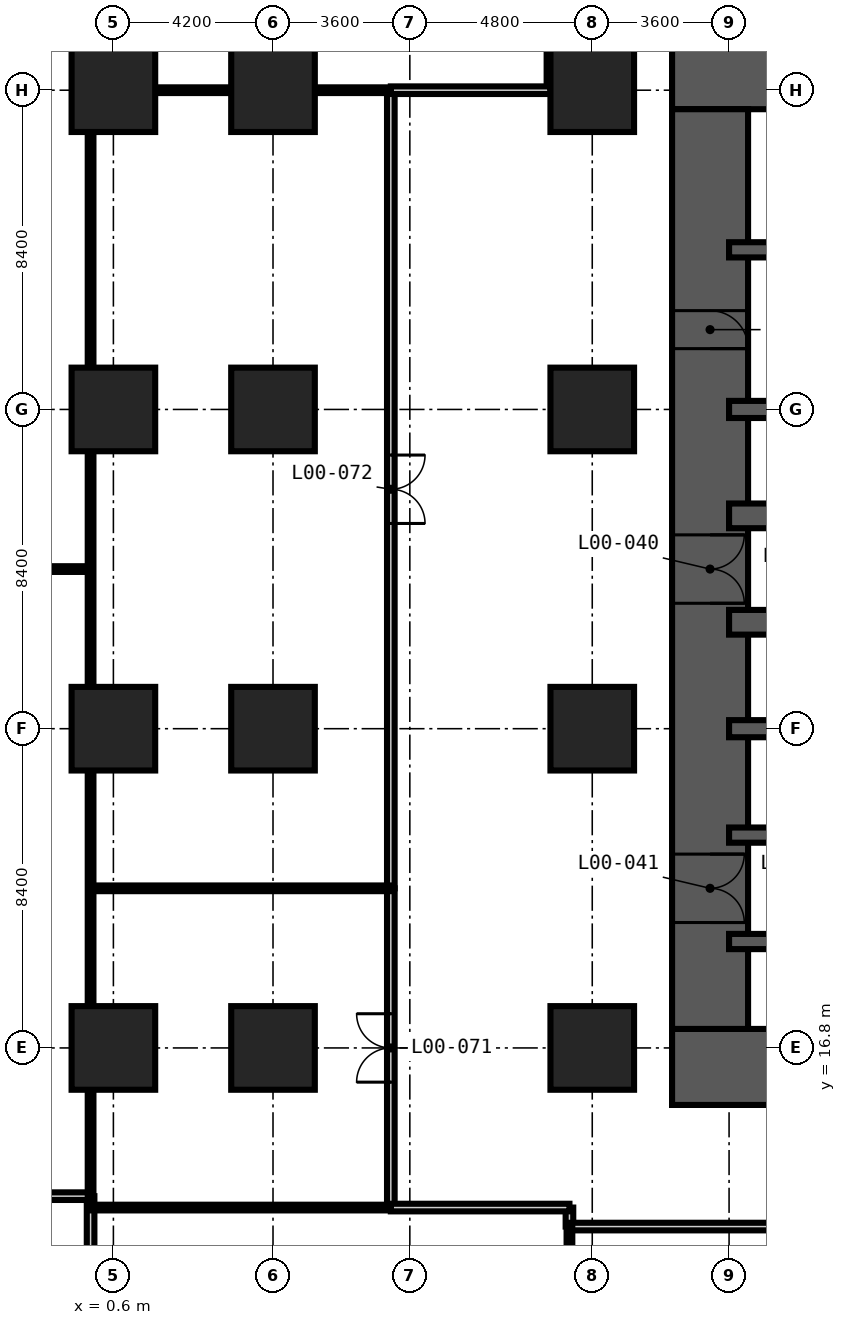
"""IFC4 building model, lengths in metres.
Left out: names, types, materials, properties, quantities, classifications, styles, units other than length and angle.
Written with IfcOpenShell. Run it as: python <this file> out.ifc"""

import sys

from ifc_helpers import new_model, si_unit, direction, frame, frame_2d, origin, origin_2d, place, context, subcontext, project, spatial, rectangle, extrude, element, fill, save


model = new_model("IFC4")
c1 = context("Model", 3, precision=1e-05, world=origin(), true_north=direction((0.0, 1.0)))
c2 = subcontext(c1, "Body", "Model", "MODEL_VIEW")
j1 = project(units=[si_unit("LENGTHUNIT", "METRE"), si_unit("PLANEANGLEUNIT", "RADIAN")], contexts=[c1])
p1 = place(None, origin())
s1 = spatial("IfcSite", under=j1, at=p1, CompositionType="ELEMENT")
p2 = place(p1, origin())
s2 = spatial("IfcBuilding", under=s1, at=p2, CompositionType="ELEMENT")
p3 = place(p2, origin())
s3 = spatial("IfcBuildingStorey", under=s2, at=p3, CompositionType="ELEMENT", Elevation=0.0)
for number, where, z_axis, x_axis in (
    (1, (0.6, 16.8, -0.3), (0.0, 0.0, 1.0), (1.0, 0.0, 0.0)),
    (2, (0.6, 25.2, -0.3), (0.0, 0.0, 1.0), (1.0, 0.0, 0.0)),
    (3, (0.6, 33.6, -0.3), (0.0, 0.0, 1.0), (1.0, 0.0, 0.0)),
    (4, (0.6, 42.0, -0.3), (0.0, 0.0, 1.0), (1.0, 0.0, 0.0)),
    (5, (4.8, 16.8, -0.3), (0.0, 0.0, 1.0), (1.0, 0.0, 0.0)),
    (6, (4.8, 25.2, -0.3), (0.0, 0.0, 1.0), (1.0, 0.0, 0.0)),
    (7, (4.8, 33.6, -0.3), (0.0, 0.0, 1.0), (1.0, 0.0, 0.0)),
    (8, (4.8, 42.0, -0.3), (0.0, 0.0, 1.0), (1.0, 0.0, 0.0)),
    (9, (13.2, 16.8, -0.3), (0.0, 0.0, 1.0), (1.0, 0.0, 0.0)),
    (10, (13.2, 25.2, -0.3), (0.0, 0.0, 1.0), (1.0, 0.0, 0.0)),
    (11, (13.2, 33.6, -0.3), (0.0, 0.0, 1.0), (1.0, 0.0, 0.0)),
    (12, (13.2, 42.0, -0.3), (0.0, 0.0, 1.0), (1.0, 0.0, 0.0)),
):
    element("IfcColumn", number, at=place(p3, frame(where, z_axis=z_axis, x_axis=x_axis)), inside=s3, PredefinedType="COLUMN", context=c2, shape_type="SweptSolid", body=[
        extrude(rectangle(XDim=2.2, YDim=2.2, at=origin_2d()), origin(), (0.0, 0.0, 1.0), 6.0),
    ])
p4 = place(p3, frame((15.3, 16.3, -0.3), z_axis=(0.0, 0.0, 1.0), x_axis=(1.0, 0.0, 0.0)))
e13 = element("IfcWall", 13, at=p4, inside=s3, PredefinedType="SHEAR", context=c2, shape_type="SweptSolid", body=[
    extrude(rectangle(XDim=28.2, YDim=2.0, at=frame_2d((14.1, 0.0))), origin(), (0.0, 0.0, 1.0), 6.0),
])
p5 = place(p4, frame((13.6, 0.0, 0.3)))
e14 = element("IfcOpeningElement", 14, at=p5, cuts=e13, PredefinedType="OPENING", context=c2, shape_type="SweptSolid", body=[
    extrude(rectangle(XDim=1.0, YDim=2.1, at=frame_2d((0.5, 1.05))), frame((0.0, 1.01, 0.0), z_axis=(0.0, -1.0, 0.0), x_axis=(1.0, 0.0, 0.0)), (0.0, 0.0, 1.0), 2.02),
])
p6 = place(p4, frame((19.9, 0.0, 0.3)))
e15 = element("IfcOpeningElement", 15, at=p6, cuts=e13, PredefinedType="OPENING", context=c2, shape_type="SweptSolid", body=[
    extrude(rectangle(XDim=1.0, YDim=2.1, at=frame_2d((0.5, 1.05))), frame((0.0, 1.01, 0.0), z_axis=(0.0, -1.0, 0.0), x_axis=(1.0, 0.0, 0.0)), (0.0, 0.0, 1.0), 2.02),
])
p7 = place(p3, frame((43.5, 42.5, -0.3), z_axis=(0.0, 0.0, 1.0), x_axis=(-1.0, 0.0, 0.0)))
e16 = element("IfcWall", 16, at=p7, inside=s3, PredefinedType="SHEAR", context=c2, shape_type="SweptSolid", body=[
    extrude(rectangle(XDim=28.2, YDim=2.0, at=frame_2d((14.1, 0.0))), origin(), (0.0, 0.0, 1.0), 6.0),
])
p8 = place(p7, frame((22.0, 0.0, 0.3)))
e17 = element("IfcOpeningElement", 17, at=p8, cuts=e16, PredefinedType="OPENING", context=c2, shape_type="SweptSolid", body=[
    extrude(rectangle(XDim=1.0, YDim=2.1, at=frame_2d((0.5, 1.05))), frame((0.0, 1.01, 0.0), z_axis=(0.0, -1.0, 0.0), x_axis=(1.0, 0.0, 0.0)), (0.0, 0.0, 1.0), 2.02),
])
p9 = place(p7, frame((11.4, 0.0, 0.3)))
e18 = element("IfcOpeningElement", 18, at=p9, cuts=e16, PredefinedType="OPENING", context=c2, shape_type="SweptSolid", body=[
    extrude(rectangle(XDim=1.2, YDim=2.2, at=frame_2d((0.6, 1.1))), frame((0.0, 1.01, 0.0), z_axis=(0.0, -1.0, 0.0), x_axis=(1.0, 0.0, 0.0)), (0.0, 0.0, 1.0), 2.02),
])
p10 = place(p3, frame((16.3, 41.5, -0.3), z_axis=(0.0, 0.0, 1.0), x_axis=(0.0, -1.0, 0.0)))
e19 = element("IfcWall", 19, at=p10, inside=s3, PredefinedType="SHEAR", context=c2, shape_type="SweptSolid", body=[
    extrude(rectangle(XDim=24.2, YDim=2.0, at=frame_2d((12.1, 0.0))), origin(), (0.0, 0.0, 1.0), 6.0),
])
p11 = place(p10, frame((11.2, 0.0, 0.3)))
e20 = element("IfcOpeningElement", 20, at=p11, cuts=e19, PredefinedType="OPENING", context=c2, shape_type="SweptSolid", body=[
    extrude(rectangle(XDim=1.8, YDim=2.2, at=frame_2d((0.9, 1.1))), frame((0.0, 1.01, 0.0), z_axis=(0.0, -1.0, 0.0), x_axis=(1.0, 0.0, 0.0)), (0.0, 0.0, 1.0), 2.02),
])
p12 = place(p10, frame((19.6, 0.0, 0.3)))
e21 = element("IfcOpeningElement", 21, at=p12, cuts=e19, PredefinedType="OPENING", context=c2, shape_type="SweptSolid", body=[
    extrude(rectangle(XDim=1.8, YDim=2.2, at=frame_2d((0.9, 1.1))), frame((0.0, 1.01, 0.0), z_axis=(0.0, -1.0, 0.0), x_axis=(1.0, 0.0, 0.0)), (0.0, 0.0, 1.0), 2.02),
])
p13 = place(p10, frame((5.3, 0.0, 0.3)))
e22 = element("IfcOpeningElement", 22, at=p13, cuts=e19, PredefinedType="OPENING", context=c2, shape_type="SweptSolid", body=[
    extrude(rectangle(XDim=1.0, YDim=2.1, at=frame_2d((0.5, 1.05))), frame((0.0, 1.01, 0.0), z_axis=(0.0, -1.0, 0.0), x_axis=(1.0, 0.0, 0.0)), (0.0, 0.0, 1.0), 2.02),
])
p14 = place(p3, frame((16.8, 19.6, -0.3), z_axis=(0.0, 0.0, 1.0), x_axis=(1.0, 0.0, 0.0)))
e23 = element("IfcWall", 23, at=p14, inside=s3, PredefinedType="SHEAR", context=c2, shape_type="SweptSolid", body=[
    extrude(rectangle(XDim=8.4, YDim=0.4, at=frame_2d((4.2, 0.0))), origin(), (0.0, 0.0, 1.0), 6.0),
])
p15 = place(p14, frame((1.55, 0.0, 0.3)))
e24 = element("IfcOpeningElement", 24, at=p15, cuts=e23, PredefinedType="OPENING", context=c2, shape_type="SweptSolid", body=[
    extrude(rectangle(XDim=1.1, YDim=2.2, at=frame_2d((0.55, 1.1))), frame((0.0, 0.21, 0.0), z_axis=(0.0, -1.0, 0.0), x_axis=(1.0, 0.0, 0.0)), (0.0, 0.0, 1.0), 0.42),
])
p16 = place(p14, frame((5.75, 0.0, 0.3)))
e25 = element("IfcOpeningElement", 25, at=p16, cuts=e23, PredefinedType="OPENING", context=c2, shape_type="SweptSolid", body=[
    extrude(rectangle(XDim=1.1, YDim=2.2, at=frame_2d((0.55, 1.1))), frame((0.0, 0.21, 0.0), z_axis=(0.0, -1.0, 0.0), x_axis=(1.0, 0.0, 0.0)), (0.0, 0.0, 1.0), 0.42),
])
p17 = place(p3, frame((16.8, 22.4, -0.3), z_axis=(0.0, 0.0, 1.0), x_axis=(1.0, 0.0, 0.0)))
e26 = element("IfcWall", 26, at=p17, inside=s3, PredefinedType="SHEAR", context=c2, shape_type="SweptSolid", body=[
    extrude(rectangle(XDim=8.4, YDim=0.4, at=frame_2d((4.2, 0.0))), origin(), (0.0, 0.0, 1.0), 6.0),
])
p18 = place(p17, frame((1.55, 0.0, 0.3)))
e27 = element("IfcOpeningElement", 27, at=p18, cuts=e26, PredefinedType="OPENING", context=c2, shape_type="SweptSolid", body=[
    extrude(rectangle(XDim=1.1, YDim=2.2, at=frame_2d((0.55, 1.1))), frame((0.0, 0.21, 0.0), z_axis=(0.0, -1.0, 0.0), x_axis=(1.0, 0.0, 0.0)), (0.0, 0.0, 1.0), 0.42),
])
p19 = place(p17, frame((5.75, 0.0, 0.3)))
e28 = element("IfcOpeningElement", 28, at=p19, cuts=e26, PredefinedType="OPENING", context=c2, shape_type="SweptSolid", body=[
    extrude(rectangle(XDim=1.1, YDim=2.2, at=frame_2d((0.55, 1.1))), frame((0.0, 0.21, 0.0), z_axis=(0.0, -1.0, 0.0), x_axis=(1.0, 0.0, 0.0)), (0.0, 0.0, 1.0), 0.42),
])
p20 = place(p3, frame((16.8, 37.8, -0.3), z_axis=(0.0, 0.0, 1.0), x_axis=(1.0, 0.0, 0.0)))
e29 = element("IfcWall", 29, at=p20, inside=s3, PredefinedType="SHEAR", context=c2, shape_type="SweptSolid", body=[
    extrude(rectangle(XDim=8.4, YDim=0.4, at=frame_2d((4.2, 0.0))), origin(), (0.0, 0.0, 1.0), 6.0),
])
p21 = place(p3, frame((16.8, 25.2, -0.3), z_axis=(0.0, 0.0, 1.0), x_axis=(1.0, 0.0, 0.0)))
e30 = element("IfcWall", 30, at=p21, inside=s3, PredefinedType="SHEAR", context=c2, shape_type="SweptSolid", body=[
    extrude(rectangle(XDim=25.2, YDim=0.45, at=frame_2d((12.6, 0.0))), origin(), (0.0, 0.0, 1.0), 6.0),
])
p22 = place(p3, frame((16.8, 33.6, -0.3), z_axis=(0.0, 0.0, 1.0), x_axis=(1.0, 0.0, 0.0)))
e31 = element("IfcWall", 31, at=p22, inside=s3, PredefinedType="SHEAR", context=c2, shape_type="SweptSolid", body=[
    extrude(rectangle(XDim=25.2, YDim=0.45, at=frame_2d((12.6, 0.0))), origin(), (0.0, 0.0, 1.0), 6.0),
])
p23 = place(p22, frame((14.2, 0.0, 0.3)))
e32 = element("IfcOpeningElement", 32, at=p23, cuts=e31, PredefinedType="OPENING", context=c2, shape_type="SweptSolid", body=[
    extrude(rectangle(XDim=1.0, YDim=2.1, at=frame_2d((0.5, 1.05))), frame((0.0, 0.235, 0.0), z_axis=(0.0, -1.0, 0.0), x_axis=(1.0, 0.0, 0.0)), (0.0, 0.0, 1.0), 0.47),
])
p24 = place(p22, frame((22.6, 0.0, 0.3)))
e33 = element("IfcOpeningElement", 33, at=p24, cuts=e31, PredefinedType="OPENING", context=c2, shape_type="SweptSolid", body=[
    extrude(rectangle(XDim=1.0, YDim=2.1, at=frame_2d((0.5, 1.05))), frame((0.0, 0.235, 0.0), z_axis=(0.0, -1.0, 0.0), x_axis=(1.0, 0.0, 0.0)), (0.0, 0.0, 1.0), 0.47),
])
p25 = place(p3, frame((16.8, 28.0, -0.3), z_axis=(0.0, 0.0, 1.0), x_axis=(1.0, 0.0, 0.0)))
e34 = element("IfcWall", 34, at=p25, inside=s3, PredefinedType="SHEAR", context=c2, shape_type="SweptSolid", body=[
    extrude(rectangle(XDim=8.4, YDim=0.65, at=frame_2d((4.2, 0.0))), origin(), (0.0, 0.0, 1.0), 6.0),
])
p26 = place(p25, frame((1.55, 0.0, 0.3)))
e35 = element("IfcOpeningElement", 35, at=p26, cuts=e34, PredefinedType="OPENING", context=c2, shape_type="SweptSolid", body=[
    extrude(rectangle(XDim=1.1, YDim=2.2, at=frame_2d((0.55, 1.1))), frame((0.0, 0.335, 0.0), z_axis=(0.0, -1.0, 0.0), x_axis=(1.0, 0.0, 0.0)), (0.0, 0.0, 1.0), 0.67),
])
p27 = place(p25, frame((5.75, 0.0, 0.3)))
e36 = element("IfcOpeningElement", 36, at=p27, cuts=e34, PredefinedType="OPENING", context=c2, shape_type="SweptSolid", body=[
    extrude(rectangle(XDim=1.1, YDim=2.2, at=frame_2d((0.55, 1.1))), frame((0.0, 0.335, 0.0), z_axis=(0.0, -1.0, 0.0), x_axis=(1.0, 0.0, 0.0)), (0.0, 0.0, 1.0), 0.67),
])
p28 = place(p3, frame((16.8, 30.8, -0.3), z_axis=(0.0, 0.0, 1.0), x_axis=(1.0, 0.0, 0.0)))
e37 = element("IfcWall", 37, at=p28, inside=s3, PredefinedType="SHEAR", context=c2, shape_type="SweptSolid", body=[
    extrude(rectangle(XDim=8.4, YDim=0.65, at=frame_2d((4.2, 0.0))), origin(), (0.0, 0.0, 1.0), 6.0),
])
p29 = place(p28, frame((1.55, 0.0, 0.3)))
e38 = element("IfcOpeningElement", 38, at=p29, cuts=e37, PredefinedType="OPENING", context=c2, shape_type="SweptSolid", body=[
    extrude(rectangle(XDim=1.1, YDim=2.2, at=frame_2d((0.55, 1.1))), frame((0.0, 0.335, 0.0), z_axis=(0.0, -1.0, 0.0), x_axis=(1.0, 0.0, 0.0)), (0.0, 0.0, 1.0), 0.67),
])
p30 = place(p28, frame((5.75, 0.0, 0.3)))
e39 = element("IfcOpeningElement", 39, at=p30, cuts=e37, PredefinedType="OPENING", context=c2, shape_type="SweptSolid", body=[
    extrude(rectangle(XDim=1.1, YDim=2.2, at=frame_2d((0.55, 1.1))), frame((0.0, 0.335, 0.0), z_axis=(0.0, -1.0, 0.0), x_axis=(1.0, 0.0, 0.0)), (0.0, 0.0, 1.0), 0.67),
])
p31 = place(p3, frame((0.0, 2.4, 0.0), z_axis=(0.0, 0.0, 1.0), x_axis=(0.0, 1.0, 0.0)))
e40 = element("IfcWall", 40, at=p31, inside=s3, PredefinedType="PARTITIONING", context=c2, shape_type="SweptSolid", body=[
    extrude(rectangle(XDim=10.5, YDim=0.2, at=frame_2d((5.25, 0.0))), origin(), (0.0, 0.0, 1.0), 5.7),
])
p32 = place(p3, frame((7.9, 12.6, 0.0), z_axis=(0.0, 0.0, 1.0), x_axis=(0.0, 1.0, 0.0)))
e41 = element("IfcWall", 41, at=p32, inside=s3, PredefinedType="PARTITIONING", context=c2, shape_type="SweptSolid", body=[
    extrude(rectangle(XDim=8.4, YDim=0.2, at=frame_2d((4.2, 0.0))), origin(), (0.0, 0.0, 1.0), 5.7),
])
p33 = place(p32, frame((3.3, 0.0, 0.0)))
e42 = element("IfcOpeningElement", 42, at=p33, cuts=e41, PredefinedType="OPENING", context=c2, shape_type="SweptSolid", body=[
    extrude(rectangle(XDim=1.8, YDim=2.4, at=frame_2d((0.9, 1.2))), frame((0.0, 0.11, 0.0), z_axis=(0.0, -1.0, 0.0), x_axis=(1.0, 0.0, 0.0)), (0.0, 0.0, 1.0), 0.22),
])
p34 = place(p3, frame((12.6, 12.1, 0.0), z_axis=(0.0, 0.0, 1.0), x_axis=(0.0, 1.0, 0.0)))
e43 = element("IfcWall", 43, at=p34, inside=s3, PredefinedType="PARTITIONING", context=c2, shape_type="SweptSolid", body=[
    extrude(rectangle(XDim=0.5, YDim=0.2, at=frame_2d((0.25, 0.0))), origin(), (0.0, 0.0, 1.0), 5.7),
])
p35 = place(p3, frame((12.6, 12.1, 0.0), z_axis=(0.0, 0.0, 1.0), x_axis=(1.0, 0.0, 0.0)))
e44 = element("IfcWall", 44, at=p35, inside=s3, PredefinedType="PARTITIONING", context=c2, shape_type="SweptSolid", body=[
    extrude(rectangle(XDim=33.6, YDim=0.2, at=frame_2d((16.8, 0.0))), origin(), (0.0, 0.0, 1.0), 5.7),
])
p36 = place(p3, frame((7.9, 12.6, 0.0), z_axis=(0.0, 0.0, 1.0), x_axis=(1.0, 0.0, 0.0)))
e45 = element("IfcWall", 45, at=p36, inside=s3, PredefinedType="PARTITIONING", context=c2, shape_type="SweptSolid", body=[
    extrude(rectangle(XDim=4.7, YDim=0.2, at=frame_2d((2.35, 0.0))), origin(), (0.0, 0.0, 1.0), 5.7),
])
p37 = place(p3, frame((7.9, 42.0, 0.0), z_axis=(0.0, 0.0, 1.0), x_axis=(0.0, -1.0, 0.0)))
e46 = element("IfcWall", 46, at=p37, inside=s3, PredefinedType="PARTITIONING", context=c2, shape_type="SweptSolid", body=[
    extrude(rectangle(XDim=21.0, YDim=0.2, at=frame_2d((10.5, 0.0))), origin(), (0.0, 0.0, 1.0), 5.7),
])
p38 = place(p37, frame((9.6, 0.0, 0.0)))
e47 = element("IfcOpeningElement", 47, at=p38, cuts=e46, PredefinedType="OPENING", context=c2, shape_type="SweptSolid", body=[
    extrude(rectangle(XDim=1.8, YDim=2.4, at=frame_2d((0.9, 1.2))), frame((0.0, 0.11, 0.0), z_axis=(0.0, -1.0, 0.0), x_axis=(1.0, 0.0, 0.0)), (0.0, 0.0, 1.0), 0.22),
])
p39 = place(p3, frame((12.1, 58.8, 0.0), z_axis=(0.0, 0.0, 1.0), x_axis=(0.0, -1.0, 0.0)))
e48 = element("IfcWall", 48, at=p39, inside=s3, PredefinedType="PARTITIONING", context=c2, shape_type="SweptSolid", body=[
    extrude(rectangle(XDim=16.8, YDim=0.2, at=frame_2d((8.4, 0.0))), origin(), (0.0, 0.0, 1.0), 5.7),
])
p40 = place(p39, frame((5.4, 0.0, 0.0)))
e49 = element("IfcOpeningElement", 49, at=p40, cuts=e48, PredefinedType="OPENING", context=c2, shape_type="SweptSolid", body=[
    extrude(rectangle(XDim=1.8, YDim=2.4, at=frame_2d((0.9, 1.2))), frame((0.0, 0.11, 0.0), z_axis=(0.0, -1.0, 0.0), x_axis=(1.0, 0.0, 0.0)), (0.0, 0.0, 1.0), 0.22),
])
p41 = place(p3, frame((0.0, 12.9, 0.0), z_axis=(0.0, 0.0, 1.0), x_axis=(-1.0, 0.0, 0.0)))
e50 = element("IfcWall", 50, at=p41, inside=s3, PredefinedType="PARTITIONING", context=c2, shape_type="SweptSolid", body=[
    extrude(rectangle(XDim=11.2, YDim=0.2, at=frame_2d((5.6, 0.0))), origin(), (0.0, 0.0, 1.0), 5.7),
])
p42 = place(p3, frame((12.1, 42.0, 0.0), z_axis=(0.0, 0.0, 1.0), x_axis=(-1.0, 0.0, 0.0)))
e51 = element("IfcWall", 51, at=p42, inside=s3, PredefinedType="PARTITIONING", context=c2, shape_type="SweptSolid", body=[
    extrude(rectangle(XDim=4.2, YDim=0.2, at=frame_2d((2.1, 0.0))), origin(), (0.0, 0.0, 1.0), 5.7),
])
p43 = place(p3, frame((0.0, 12.9, 0.0), z_axis=(0.0, 0.0, 1.0), x_axis=(0.0, 1.0, 0.0)))
e52 = element("IfcWall", 52, at=p43, inside=s3, PredefinedType="PARTITIONING", context=c2, shape_type="SweptSolid", body=[
    extrude(rectangle(XDim=33.0, YDim=0.15, at=frame_2d((16.5, 0.0))), origin(), (0.0, 0.0, 1.0), 5.7),
])
p44 = place(p3, frame((12.6, 2.4, 0.0), z_axis=(0.0, 0.0, 1.0), x_axis=(0.0, 1.0, 0.0)))
e53 = element("IfcWall", 53, at=p44, inside=s3, PredefinedType="PARTITIONING", context=c2, shape_type="SweptSolid", body=[
    extrude(rectangle(XDim=9.7, YDim=0.15, at=frame_2d((4.85, 0.0))), origin(), (0.0, 0.0, 1.0), 5.7),
])
for number, where, z_axis, x_axis in (
    (54, (0.0, 12.6, 0.0), (0.0, 0.0, 1.0), (1.0, 0.0, 0.0)),
    (55, (0.0, 21.0, 0.0), (0.0, 0.0, 1.0), (1.0, 0.0, 0.0)),
):
    element("IfcWall", number, at=place(p3, frame(where, z_axis=z_axis, x_axis=x_axis)), inside=s3, PredefinedType="PARTITIONING", context=c2, shape_type="SweptSolid", body=[
        extrude(rectangle(XDim=7.9, YDim=0.15, at=frame_2d((3.95, 0.0))), origin(), (0.0, 0.0, 1.0), 5.7),
    ])
p45 = place(p3, frame((-18.0, 29.4, 0.0), z_axis=(0.0, 0.0, 1.0), x_axis=(1.0, 0.0, 0.0)))
e56 = element("IfcWall", 56, at=p45, inside=s3, PredefinedType="PARTITIONING", context=c2, shape_type="SweptSolid", body=[
    extrude(rectangle(XDim=18.0, YDim=0.15, at=frame_2d((9.0, 0.0))), origin(), (0.0, 0.0, 1.0), 5.7),
])
p46 = place(p3, frame((0.0, 42.0, 0.0), z_axis=(0.0, 0.0, 1.0), x_axis=(1.0, 0.0, 0.0)))
e57 = element("IfcWall", 57, at=p46, inside=s3, PredefinedType="PARTITIONING", context=c2, shape_type="SweptSolid", body=[
    extrude(rectangle(XDim=7.9, YDim=0.15, at=frame_2d((3.95, 0.0))), origin(), (0.0, 0.0, 1.0), 5.7),
])
p47 = place(p11, origin())
e58 = element("IfcDoor", 58, at=p47, inside=s3, OperationType="DOUBLE_DOOR_DOUBLE_SWING", PredefinedType="DOOR", context=c2, shape_type="SweptSolid", body=[
    extrude(rectangle(XDim=1.8, YDim=2.2, at=frame_2d((0.9, 1.1))), frame((0.0, 0.025, 0.0), z_axis=(0.0, -1.0, 0.0), x_axis=(1.0, 0.0, 0.0)), (0.0, 0.0, 1.0), 0.05),
])
fill(e20, e58)
p48 = place(p12, origin())
e59 = element("IfcDoor", 59, at=p48, inside=s3, OperationType="DOUBLE_DOOR_DOUBLE_SWING", PredefinedType="DOOR", context=c2, shape_type="SweptSolid", body=[
    extrude(rectangle(XDim=1.8, YDim=2.2, at=frame_2d((0.9, 1.1))), frame((0.0, 0.025, 0.0), z_axis=(0.0, -1.0, 0.0), x_axis=(1.0, 0.0, 0.0)), (0.0, 0.0, 1.0), 0.05),
])
fill(e21, e59)
p49 = place(p13, origin())
e60 = element("IfcDoor", 60, at=p49, inside=s3, OperationType="SINGLE_SWING_RIGHT", PredefinedType="DOOR", context=c2, shape_type="SweptSolid", body=[
    extrude(rectangle(XDim=1.0, YDim=2.1, at=frame_2d((0.5, 1.05))), frame((0.0, 0.025, 0.0), z_axis=(0.0, -1.0, 0.0), x_axis=(1.0, 0.0, 0.0)), (0.0, 0.0, 1.0), 0.05),
])
fill(e22, e60)
p50 = place(p33, origin())
e61 = element("IfcDoor", 61, at=p50, inside=s3, OperationType="DOUBLE_DOOR_DOUBLE_SWING", PredefinedType="DOOR", context=c2, shape_type="SweptSolid", body=[
    extrude(rectangle(XDim=1.8, YDim=2.4, at=frame_2d((0.9, 1.2))), frame((0.0, 0.025, 0.0), z_axis=(0.0, -1.0, 0.0), x_axis=(1.0, 0.0, 0.0)), (0.0, 0.0, 1.0), 0.05),
])
fill(e42, e61)
p51 = place(p38, origin())
e62 = element("IfcDoor", 62, at=p51, inside=s3, OperationType="DOUBLE_DOOR_DOUBLE_SWING", PredefinedType="DOOR", context=c2, shape_type="SweptSolid", body=[
    extrude(rectangle(XDim=1.8, YDim=2.4, at=frame_2d((0.9, 1.2))), frame((0.0, 0.025, 0.0), z_axis=(0.0, -1.0, 0.0), x_axis=(1.0, 0.0, 0.0)), (0.0, 0.0, 1.0), 0.05),
])
fill(e47, e62)
save(model, sys.argv[1])
